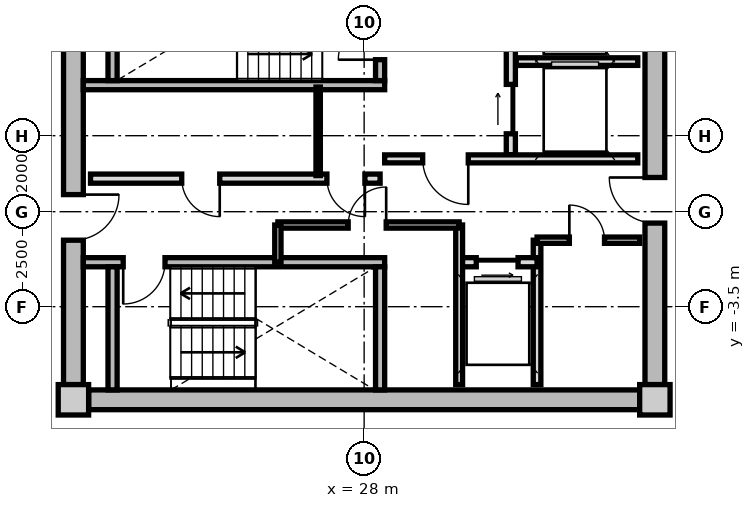
"""IFC4 building model, lengths in metres.
Left out: names, types, materials, properties, quantities, classifications, styles, units other than length and angle.
Written with IfcOpenShell. Run it as: python <this file> out.ifc"""

import sys

from ifc_helpers import new_model, si_unit, direction, frame, frame_2d, origin, origin_2d, place, context, subcontext, project, spatial, rectangle, extrude, source, transform, mapped, element, fill, save


model = new_model("IFC4")
c1 = context("Model", 3, precision=1e-05, world=origin(), true_north=direction((0.0, 1.0)))
c2 = subcontext(c1, "Body", "Model", "MODEL_VIEW")
j1 = project(units=[si_unit("LENGTHUNIT", "METRE"), si_unit("PLANEANGLEUNIT", "RADIAN")], contexts=[c1])
p1 = place(None, origin())
s1 = spatial("IfcSite", under=j1, at=p1, CompositionType="ELEMENT")
p2 = place(p1, origin())
s2 = spatial("IfcBuilding", under=s1, at=p2, CompositionType="ELEMENT")
p3 = place(p2, frame((0.0, 0.0, 193.7)))
s3 = spatial("IfcBuildingStorey", under=s2, at=p3, CompositionType="ELEMENT", Elevation=193.7)
m1 = source(origin(), c2, "Body", "SweptSolid", [
    extrude(rectangle(XDim=0.8, YDim=0.8, at=origin_2d()), origin(), (0.0, 0.0, 1.0), 3.05),
])
for number, where, z_axis, x_axis in (
    (1, (20.35, -5.95, 0.0), (0.0, 0.0, 1.0), (1.0, 0.0, 0.0)),
    (2, (35.65, -5.95, 0.0), (0.0, 0.0, 1.0), (1.0, 0.0, 0.0)),
):
    element("IfcColumn", number, at=place(p3, frame(where, z_axis=z_axis, x_axis=x_axis)), inside=s3, PredefinedType="COLUMN", context=c2, shape_type="MappedRepresentation", body=[
        mapped(m1, transform((0.0, 0.0, 0.0), x_axis=(1.0, 0.0, 0.0), y_axis=(0.0, 1.0, 0.0), z_axis=(0.0, 0.0, 1.0), scale=1.0)),
    ])
m2 = source(origin(), c2, "Body", "SweptSolid", [
    extrude(rectangle(XDim=14.5, YDim=0.52, at=frame_2d((7.25, 0.0))), origin(), (0.0, 0.0, 1.0), 2.81),
])
p4 = place(p3, frame((35.25, -5.95, 0.0), z_axis=(0.0, 0.0, 1.0), x_axis=(-1.0, 0.0, 0.0)))
e3 = element("IfcWall", 3, at=p4, inside=s3, PredefinedType="SHEAR", context=c2, shape_type="MappedRepresentation", body=[
    mapped(m2, transform((0.0, 0.0, 0.0), x_axis=(1.0, 0.0, 0.0), y_axis=(0.0, 1.0, 0.0), z_axis=(0.0, 0.0, 1.0), scale=1.0)),
])
m3 = source(origin(), c2, "Body", "SweptSolid", [
    extrude(rectangle(XDim=11.1, YDim=0.52, at=frame_2d((5.55, 0.0))), origin(), (0.0, 0.0, 1.0), 2.81),
])
p5 = place(p3, frame((20.35, -5.55, 0.0), z_axis=(0.0, 0.0, 1.0), x_axis=(0.0, 1.0, 0.0)))
e4 = element("IfcWall", 4, at=p5, inside=s3, PredefinedType="SHEAR", context=c2, shape_type="MappedRepresentation", body=[
    mapped(m3, transform((0.0, 0.0, 0.0), x_axis=(1.0, 0.0, 0.0), y_axis=(0.0, 1.0, 0.0), z_axis=(0.0, 0.0, 1.0), scale=1.0)),
])
p6 = place(p5, frame((3.8, 0.0, 0.0)))
e5 = element("IfcOpeningElement", 5, at=p6, cuts=e4, PredefinedType="OPENING", context=c2, shape_type="SweptSolid", body=[
    extrude(rectangle(XDim=1.2, YDim=2.15, at=frame_2d((0.6, 1.075))), frame((0.0, 0.27, 0.0), z_axis=(0.0, -1.0, 0.0), x_axis=(1.0, 0.0, 0.0)), (0.0, 0.0, 1.0), 0.54),
])
p7 = place(p3, frame((35.65, 5.55, 0.0), z_axis=(0.0, 0.0, 1.0), x_axis=(0.0, -1.0, 0.0)))
e6 = element("IfcWall", 6, at=p7, inside=s3, PredefinedType="SHEAR", context=c2, shape_type="MappedRepresentation", body=[
    mapped(m3, transform((0.0, 0.0, 0.0), x_axis=(1.0, 0.0, 0.0), y_axis=(0.0, 1.0, 0.0), z_axis=(0.0, 0.0, 1.0), scale=1.0)),
])
p8 = place(p7, frame((5.65, 0.0, 0.0)))
e7 = element("IfcOpeningElement", 7, at=p8, cuts=e6, PredefinedType="OPENING", context=c2, shape_type="SweptSolid", body=[
    extrude(rectangle(XDim=1.2, YDim=2.15, at=frame_2d((0.6, 1.075))), frame((0.0, 0.27, 0.0), z_axis=(0.0, -1.0, 0.0), x_axis=(1.0, 0.0, 0.0)), (0.0, 0.0, 1.0), 0.54),
])
m4 = source(origin(), c2, "Body", "SweptSolid", [
    extrude(rectangle(XDim=7.93, YDim=0.24, at=frame_2d((3.965, 0.0))), origin(), (0.0, 0.0, 1.0), 2.81),
])
p9 = place(p3, frame((20.61, 2.33, 0.0), z_axis=(0.0, 0.0, 1.0), x_axis=(1.0, 0.0, 0.0)))
e8 = element("IfcWall", 8, at=p9, inside=s3, PredefinedType="PARTITIONING", context=c2, shape_type="MappedRepresentation", body=[
    mapped(m4, transform((0.0, 0.0, 0.0), x_axis=(1.0, 0.0, 0.0), y_axis=(0.0, 1.0, 0.0), z_axis=(0.0, 0.0, 1.0), scale=1.0)),
])
m5 = source(origin(), c2, "Body", "SweptSolid", [
    extrude(rectangle(XDim=3.24, YDim=0.24, at=frame_2d((1.62, 0.0))), origin(), (0.0, 0.0, 1.0), 2.81),
])
p10 = place(p3, frame((21.38, 2.45, 0.0), z_axis=(0.0, 0.0, 1.0), x_axis=(0.0, 1.0, 0.0)))
e9 = element("IfcWall", 9, at=p10, inside=s3, PredefinedType="PARTITIONING", context=c2, shape_type="MappedRepresentation", body=[
    mapped(m5, transform((0.0, 0.0, 0.0), x_axis=(1.0, 0.0, 0.0), y_axis=(0.0, 1.0, 0.0), z_axis=(0.0, 0.0, 1.0), scale=1.0)),
])
p11 = place(p3, frame((28.42, 2.45, 0.0), z_axis=(0.0, 0.0, 1.0), x_axis=(0.0, 1.0, 0.0)))
e10 = element("IfcWall", 10, at=p11, inside=s3, PredefinedType="PARTITIONING", context=c2, shape_type="MappedRepresentation", body=[
    mapped(m5, transform((0.0, 0.0, 0.0), x_axis=(1.0, 0.0, 0.0), y_axis=(0.0, 1.0, 0.0), z_axis=(0.0, 0.0, 1.0), scale=1.0)),
])
p12 = place(p11, frame((0.55, 0.0, 0.0)))
e11 = element("IfcOpeningElement", 11, at=p12, cuts=e10, PredefinedType="OPENING", context=c2, shape_type="SweptSolid", body=[
    extrude(rectangle(XDim=1.1, YDim=2.15, at=frame_2d((0.55, 1.075))), frame((0.0, 0.13, 0.0), z_axis=(0.0, -1.0, 0.0), x_axis=(1.0, 0.0, 0.0)), (0.0, 0.0, 1.0), 0.26),
])
p13 = place(p3, frame((20.61, -2.33, 0.0), z_axis=(0.0, 0.0, 1.0), x_axis=(1.0, 0.0, 0.0)))
e12 = element("IfcWall", 12, at=p13, inside=s3, PredefinedType="PARTITIONING", context=c2, shape_type="MappedRepresentation", body=[
    mapped(m4, transform((0.0, 0.0, 0.0), x_axis=(1.0, 0.0, 0.0), y_axis=(0.0, 1.0, 0.0), z_axis=(0.0, 0.0, 1.0), scale=1.0)),
])
p14 = place(p13, frame((1.05, 0.0, 0.0)))
e13 = element("IfcOpeningElement", 13, at=p14, cuts=e12, PredefinedType="OPENING", context=c2, shape_type="SweptSolid", body=[
    extrude(rectangle(XDim=1.1, YDim=2.15, at=frame_2d((0.55, 1.075))), frame((0.0, 0.13, 0.0), z_axis=(0.0, -1.0, 0.0), x_axis=(1.0, 0.0, 0.0)), (0.0, 0.0, 1.0), 0.26),
])
for number, where, z_axis, x_axis in (
    (14, (21.38, -5.69, 0.0), (0.0, 0.0, 1.0), (0.0, 1.0, 0.0)),
    (15, (28.42, -5.69, 0.0), (0.0, 0.0, 1.0), (0.0, 1.0, 0.0)),
):
    element("IfcWall", number, at=place(p3, frame(where, z_axis=z_axis, x_axis=x_axis)), inside=s3, PredefinedType="PARTITIONING", context=c2, shape_type="MappedRepresentation", body=[
        mapped(m5, transform((0.0, 0.0, 0.0), x_axis=(1.0, 0.0, 0.0), y_axis=(0.0, 1.0, 0.0), z_axis=(0.0, 0.0, 1.0), scale=1.0)),
    ])
m6 = source(origin(), c2, "Body", "SweptSolid", [
    extrude(rectangle(XDim=5.0, YDim=0.24, at=frame_2d((2.5, 0.0))), origin(), (0.0, 0.0, 1.0), 2.795),
])
p15 = place(p3, frame((31.86, 0.5, 0.0), z_axis=(0.0, 0.0, 1.0), x_axis=(0.0, 1.0, 0.0)))
e16 = element("IfcWall", 16, at=p15, inside=s3, PredefinedType="PARTITIONING", context=c2, shape_type="MappedRepresentation", body=[
    mapped(m6, transform((0.0, 0.0, 0.0), x_axis=(1.0, 0.0, 0.0), y_axis=(0.0, 1.0, 0.0), z_axis=(0.0, 0.0, 1.0), scale=1.0)),
])
p16 = place(p15, frame((3.05, 0.0, 0.0)))
e17 = element("IfcOpeningElement", 17, at=p16, cuts=e16, PredefinedType="OPENING", context=c2, shape_type="SweptSolid", body=[
    extrude(rectangle(XDim=1.3, YDim=2.2, at=frame_2d((0.65, 1.1))), frame((0.0, 0.13, 0.0), z_axis=(0.0, -1.0, 0.0), x_axis=(1.0, 0.0, 0.0)), (0.0, 0.0, 1.0), 0.26),
])
p17 = place(p15, frame((0.55, 0.0, 0.0)))
e18 = element("IfcOpeningElement", 18, at=p17, cuts=e16, PredefinedType="OPENING", context=c2, shape_type="SweptSolid", body=[
    extrude(rectangle(XDim=1.3, YDim=2.2, at=frame_2d((0.65, 1.1))), frame((0.0, 0.13, 0.0), z_axis=(0.0, -1.0, 0.0), x_axis=(1.0, 0.0, 0.0)), (0.0, 0.0, 1.0), 0.26),
])
m7 = source(origin(), c2, "Body", "SweptSolid", [
    extrude(rectangle(XDim=3.2, YDim=0.2, at=frame_2d((1.6, 0.0))), origin(), (0.0, 0.0, 1.0), 2.795),
])
p18 = place(p3, frame((32.0, 2.95, 0.0), z_axis=(0.0, 0.0, 1.0), x_axis=(1.0, 0.0, 0.0)))
e19 = element("IfcWall", 19, at=p18, inside=s3, PredefinedType="PARTITIONING", context=c2, shape_type="MappedRepresentation", body=[
    mapped(m7, transform((0.0, 0.0, 0.0), x_axis=(1.0, 0.0, 0.0), y_axis=(0.0, 1.0, 0.0), z_axis=(0.0, 0.0, 1.0), scale=1.0)),
])
m8 = source(origin(), c2, "Body", "SweptSolid", [
    extrude(rectangle(XDim=6.66, YDim=0.21, at=frame_2d((3.33, 0.0))), origin(), (0.0, 0.0, 1.0), 2.795),
])
p19 = place(p3, frame((28.54, 0.39, 0.0), z_axis=(0.0, 0.0, 1.0), x_axis=(1.0, 0.0, 0.0)))
e20 = element("IfcWall", 20, at=p19, inside=s3, PredefinedType="PARTITIONING", context=c2, shape_type="MappedRepresentation", body=[
    mapped(m8, transform((0.0, 0.0, 0.0), x_axis=(1.0, 0.0, 0.0), y_axis=(0.0, 1.0, 0.0), z_axis=(0.0, 0.0, 1.0), scale=1.0)),
])
p20 = place(p19, frame((1.0, 0.0, 0.0)))
e21 = element("IfcOpeningElement", 21, at=p20, cuts=e20, PredefinedType="OPENING", context=c2, shape_type="SweptSolid", body=[
    extrude(rectangle(XDim=1.2, YDim=2.15, at=frame_2d((0.6, 1.075))), frame((0.0, 0.115, 0.0), z_axis=(0.0, -1.0, 0.0), x_axis=(1.0, 0.0, 0.0)), (0.0, 0.0, 1.0), 0.23),
])
m9 = source(origin(), c2, "Body", "SweptSolid", [
    extrude(rectangle(XDim=7.62, YDim=0.24, at=frame_2d((3.81, 0.0))), origin(), (0.0, 0.0, 1.0), 2.795),
])
p21 = place(p3, frame((20.8, -0.13, 0.0), z_axis=(0.0, 0.0, 1.0), x_axis=(1.0, 0.0, 0.0)))
e22 = element("IfcWall", 22, at=p21, inside=s3, PredefinedType="PARTITIONING", context=c2, shape_type="MappedRepresentation", body=[
    mapped(m9, transform((0.0, 0.0, 0.0), x_axis=(1.0, 0.0, 0.0), y_axis=(0.0, 1.0, 0.0), z_axis=(0.0, 0.0, 1.0), scale=1.0)),
])
p22 = place(p21, frame((6.22, 0.0, 0.0)))
e23 = element("IfcOpeningElement", 23, at=p22, cuts=e22, PredefinedType="OPENING", context=c2, shape_type="SweptSolid", body=[
    extrude(rectangle(XDim=1.0, YDim=2.1, at=frame_2d((0.5, 1.05))), frame((0.0, 0.13, 0.0), z_axis=(0.0, -1.0, 0.0), x_axis=(1.0, 0.0, 0.0)), (0.0, 0.0, 1.0), 0.26),
])
p23 = place(p21, frame((2.4, 0.0, 0.0)))
e24 = element("IfcOpeningElement", 24, at=p23, cuts=e22, PredefinedType="OPENING", context=c2, shape_type="SweptSolid", body=[
    extrude(rectangle(XDim=1.0, YDim=2.1, at=frame_2d((0.5, 1.05))), frame((0.0, 0.13, 0.0), z_axis=(0.0, -1.0, 0.0), x_axis=(1.0, 0.0, 0.0)), (0.0, 0.0, 1.0), 0.26),
])
m10 = source(origin(), c2, "Body", "SweptSolid", [
    extrude(rectangle(XDim=2.33, YDim=0.115, at=frame_2d((1.165, 0.0))), origin(), (0.0, 0.0, 1.0), 2.795),
])
p24 = place(p3, frame((26.79, -0.05, 0.0), z_axis=(0.0, 0.0, 1.0), x_axis=(0.0, 1.0, 0.0)))
e25 = element("IfcWall", 25, at=p24, inside=s3, PredefinedType="PARTITIONING", context=c2, shape_type="MappedRepresentation", body=[
    mapped(m10, transform((0.0, 0.0, 0.0), x_axis=(1.0, 0.0, 0.0), y_axis=(0.0, 1.0, 0.0), z_axis=(0.0, 0.0, 1.0), scale=1.0)),
])
m11 = source(origin(), c2, "Body", "SweptSolid", [
    extrude(rectangle(XDim=3.8, YDim=0.2, at=frame_2d((1.9, 0.0))), origin(), (0.0, 0.0, 1.0), 2.795),
])
p25 = place(p3, frame((32.55, -5.55, 0.0), z_axis=(0.0, 0.0, 1.0), x_axis=(0.0, 1.0, 0.0)))
e26 = element("IfcWall", 26, at=p25, inside=s3, PredefinedType="PARTITIONING", context=c2, shape_type="MappedRepresentation", body=[
    mapped(m11, transform((0.0, 0.0, 0.0), x_axis=(1.0, 0.0, 0.0), y_axis=(0.0, 1.0, 0.0), z_axis=(0.0, 0.0, 1.0), scale=1.0)),
])
m12 = source(origin(), c2, "Body", "SweptSolid", [
    extrude(rectangle(XDim=2.05, YDim=0.24, at=frame_2d((1.025, 0.0))), origin(), (0.0, 0.0, 1.0), 2.795),
])
p26 = place(p3, frame((30.5, -2.33, 0.0), z_axis=(0.0, 0.0, 1.0), x_axis=(1.0, 0.0, 0.0)))
e27 = element("IfcWall", 27, at=p26, inside=s3, PredefinedType="PARTITIONING", context=c2, shape_type="MappedRepresentation", body=[
    mapped(m12, transform((0.0, 0.0, 0.0), x_axis=(1.0, 0.0, 0.0), y_axis=(0.0, 1.0, 0.0), z_axis=(0.0, 0.0, 1.0), scale=1.0)),
])
p27 = place(p26, frame((0.45, 0.0, 0.0)))
e28 = element("IfcOpeningElement", 28, at=p27, cuts=e27, PredefinedType="OPENING", context=c2, shape_type="SweptSolid", body=[
    extrude(rectangle(XDim=1.1, YDim=2.2, at=frame_2d((0.55, 1.1))), frame((0.0, 0.13, 0.0), z_axis=(0.0, -1.0, 0.0), x_axis=(1.0, 0.0, 0.0)), (0.0, 0.0, 1.0), 0.26),
])
m13 = source(origin(), c2, "Body", "SweptSolid", [
    extrude(rectangle(XDim=4.2, YDim=0.18, at=frame_2d((2.1, 0.0))), origin(), (0.0, 0.0, 1.0), 2.795),
])
p28 = place(p3, frame((30.5, -5.55, 0.0), z_axis=(0.0, 0.0, 1.0), x_axis=(0.0, 1.0, 0.0)))
e29 = element("IfcWall", 29, at=p28, inside=s3, PredefinedType="PARTITIONING", context=c2, shape_type="MappedRepresentation", body=[
    mapped(m13, transform((0.0, 0.0, 0.0), x_axis=(1.0, 0.0, 0.0), y_axis=(0.0, 1.0, 0.0), z_axis=(0.0, 0.0, 1.0), scale=1.0)),
])
m14 = source(origin(), c2, "Body", "SweptSolid", [
    extrude(rectangle(XDim=4.77, YDim=0.165, at=frame_2d((2.385, 0.0))), origin(), (0.0, 0.0, 1.0), 2.795),
])
p29 = place(p3, frame((25.73, -1.35, 0.0), z_axis=(0.0, 0.0, 1.0), x_axis=(1.0, 0.0, 0.0)))
e30 = element("IfcWall", 30, at=p29, inside=s3, PredefinedType="PARTITIONING", context=c2, shape_type="MappedRepresentation", body=[
    mapped(m14, transform((0.0, 0.0, 0.0), x_axis=(1.0, 0.0, 0.0), y_axis=(0.0, 1.0, 0.0), z_axis=(0.0, 0.0, 1.0), scale=1.0)),
])
p30 = place(p29, frame((1.85, 0.0, 0.0)))
e31 = element("IfcOpeningElement", 31, at=p30, cuts=e30, PredefinedType="OPENING", context=c2, shape_type="SweptSolid", body=[
    extrude(rectangle(XDim=1.0, YDim=2.1, at=frame_2d((0.5, 1.05))), frame((0.0, 0.093, 0.0), z_axis=(0.0, -1.0, 0.0), x_axis=(1.0, 0.0, 0.0)), (0.0, 0.0, 1.0), 0.185),
])
m15 = source(origin(), c2, "Body", "SweptSolid", [
    extrude(rectangle(XDim=0.98, YDim=0.165, at=frame_2d((0.49, 0.0))), origin(), (0.0, 0.0, 1.0), 2.795),
])
p31 = place(p3, frame((25.73, -2.33, 0.0), z_axis=(0.0, 0.0, 1.0), x_axis=(0.0, 1.0, 0.0)))
e32 = element("IfcWall", 32, at=p31, inside=s3, PredefinedType="PARTITIONING", context=c2, shape_type="MappedRepresentation", body=[
    mapped(m15, transform((0.0, 0.0, 0.0), x_axis=(1.0, 0.0, 0.0), y_axis=(0.0, 1.0, 0.0), z_axis=(0.0, 0.0, 1.0), scale=1.0)),
])
m16 = source(origin(), c2, "Body", "SweptSolid", [
    extrude(rectangle(XDim=2.7, YDim=0.165, at=frame_2d((1.35, 0.0))), origin(), (0.0, 0.0, 1.0), 2.795),
])
p32 = place(p3, frame((32.55, -1.75, 0.0), z_axis=(0.0, 0.0, 1.0), x_axis=(1.0, 0.0, 0.0)))
e33 = element("IfcWall", 33, at=p32, inside=s3, PredefinedType="PARTITIONING", context=c2, shape_type="MappedRepresentation", body=[
    mapped(m16, transform((0.0, 0.0, 0.0), x_axis=(1.0, 0.0, 0.0), y_axis=(0.0, 1.0, 0.0), z_axis=(0.0, 0.0, 1.0), scale=1.0)),
])
p33 = place(p32, frame((0.85, 0.0, 0.0)))
e34 = element("IfcOpeningElement", 34, at=p33, cuts=e33, PredefinedType="OPENING", context=c2, shape_type="SweptSolid", body=[
    extrude(rectangle(XDim=0.925, YDim=2.1, at=frame_2d((0.462, 1.05))), frame((0.0, 0.093, 0.0), z_axis=(0.0, -1.0, 0.0), x_axis=(1.0, 0.0, 0.0)), (0.0, 0.0, 1.0), 0.185),
])
m17 = source(origin(), c2, "Body", "SweptSolid", [
    extrude(rectangle(XDim=1.1, YDim=2.15, at=frame_2d((0.55, 1.075))), frame((0.0, 0.025, 0.0), z_axis=(0.0, -1.0, 0.0), x_axis=(1.0, 0.0, 0.0)), (0.0, 0.0, 1.0), 0.05),
])
p34 = place(p12, origin())
e35 = element("IfcDoor", 35, at=p34, inside=s3, OperationType="SINGLE_SWING_LEFT", PredefinedType="DOOR", context=c2, shape_type="MappedRepresentation", body=[
    mapped(m17, transform((0.0, 0.0, 0.0), x_axis=(1.0, 0.0, 0.0), y_axis=(0.0, 1.0, 0.0), z_axis=(0.0, 0.0, 1.0), scale=1.0)),
])
fill(e11, e35)
p35 = place(p14, frame((1.1, 0.0, 0.0), z_axis=(0.0, 0.0, 1.0), x_axis=(-1.0, 0.0, 0.0)))
e36 = element("IfcDoor", 36, at=p35, inside=s3, OperationType="SINGLE_SWING_RIGHT", PredefinedType="DOOR", context=c2, shape_type="MappedRepresentation", body=[
    mapped(m17, transform((0.0, 0.0, 0.0), x_axis=(1.0, 0.0, 0.0), y_axis=(0.0, 1.0, 0.0), z_axis=(0.0, 0.0, 1.0), scale=1.0)),
])
fill(e13, e36)
m18 = source(origin(), c2, "Body", "SweptSolid", [
    extrude(rectangle(XDim=1.3, YDim=2.2, at=frame_2d((0.65, 1.1))), frame((0.0, 0.025, 0.0), z_axis=(0.0, -1.0, 0.0), x_axis=(1.0, 0.0, 0.0)), (0.0, 0.0, 1.0), 0.05),
])
p36 = place(p17, origin())
e37 = element("IfcDoor", 37, at=p36, inside=s3, OperationType="SLIDING_TO_RIGHT", PredefinedType="DOOR", context=c2, shape_type="MappedRepresentation", body=[
    mapped(m18, transform((0.0, 0.0, 0.0), x_axis=(1.0, 0.0, 0.0), y_axis=(0.0, 1.0, 0.0), z_axis=(0.0, 0.0, 1.0), scale=1.0)),
])
fill(e18, e37)
m19 = source(origin(), c2, "Body", "SweptSolid", [
    extrude(rectangle(XDim=1.2, YDim=2.15, at=frame_2d((0.6, 1.075))), frame((0.0, 0.025, 0.0), z_axis=(0.0, -1.0, 0.0), x_axis=(1.0, 0.0, 0.0)), (0.0, 0.0, 1.0), 0.05),
])
p37 = place(p20, frame((1.2, 0.0, 0.0), z_axis=(0.0, 0.0, 1.0), x_axis=(-1.0, 0.0, 0.0)))
e38 = element("IfcDoor", 38, at=p37, inside=s3, OperationType="SINGLE_SWING_LEFT", PredefinedType="DOOR", context=c2, shape_type="MappedRepresentation", body=[
    mapped(m19, transform((0.0, 0.0, 0.0), x_axis=(1.0, 0.0, 0.0), y_axis=(0.0, 1.0, 0.0), z_axis=(0.0, 0.0, 1.0), scale=1.0)),
])
fill(e21, e38)
p38 = place(p6, frame((1.2, 0.0, 0.0), z_axis=(0.0, 0.0, 1.0), x_axis=(-1.0, 0.0, 0.0)))
e39 = element("IfcDoor", 39, at=p38, inside=s3, OperationType="SINGLE_SWING_LEFT", PredefinedType="DOOR", context=c2, shape_type="MappedRepresentation", body=[
    mapped(m19, transform((0.0, 0.0, 0.0), x_axis=(1.0, 0.0, 0.0), y_axis=(0.0, 1.0, 0.0), z_axis=(0.0, 0.0, 1.0), scale=1.0)),
])
fill(e5, e39)
p39 = place(p8, frame((1.2, 0.0, 0.0), z_axis=(0.0, 0.0, 1.0), x_axis=(-1.0, 0.0, 0.0)))
e40 = element("IfcDoor", 40, at=p39, inside=s3, OperationType="SINGLE_SWING_RIGHT", PredefinedType="DOOR", context=c2, shape_type="MappedRepresentation", body=[
    mapped(m19, transform((0.0, 0.0, 0.0), x_axis=(1.0, 0.0, 0.0), y_axis=(0.0, 1.0, 0.0), z_axis=(0.0, 0.0, 1.0), scale=1.0)),
])
fill(e7, e40)
m20 = source(origin(), c2, "Body", "SweptSolid", [
    extrude(rectangle(XDim=1.0, YDim=2.1, at=frame_2d((0.5, 1.05))), frame((0.0, 0.025, 0.0), z_axis=(0.0, -1.0, 0.0), x_axis=(1.0, 0.0, 0.0)), (0.0, 0.0, 1.0), 0.05),
])
p40 = place(p22, frame((1.0, 0.0, 0.0), z_axis=(0.0, 0.0, 1.0), x_axis=(-1.0, 0.0, 0.0)))
e41 = element("IfcDoor", 41, at=p40, inside=s3, OperationType="SINGLE_SWING_LEFT", PredefinedType="DOOR", context=c2, shape_type="MappedRepresentation", body=[
    mapped(m20, transform((0.0, 0.0, 0.0), x_axis=(1.0, 0.0, 0.0), y_axis=(0.0, 1.0, 0.0), z_axis=(0.0, 0.0, 1.0), scale=1.0)),
])
fill(e23, e41)
p41 = place(p23, frame((1.0, 0.0, 0.0), z_axis=(0.0, 0.0, 1.0), x_axis=(-1.0, 0.0, 0.0)))
e42 = element("IfcDoor", 42, at=p41, inside=s3, OperationType="SINGLE_SWING_LEFT", PredefinedType="DOOR", context=c2, shape_type="MappedRepresentation", body=[
    mapped(m20, transform((0.0, 0.0, 0.0), x_axis=(1.0, 0.0, 0.0), y_axis=(0.0, 1.0, 0.0), z_axis=(0.0, 0.0, 1.0), scale=1.0)),
])
fill(e24, e42)
m21 = source(origin(), c2, "Body", "SweptSolid", [
    extrude(rectangle(XDim=1.1, YDim=2.2, at=frame_2d((0.55, 1.1))), frame((0.0, 0.025, 0.0), z_axis=(0.0, -1.0, 0.0), x_axis=(1.0, 0.0, 0.0)), (0.0, 0.0, 1.0), 0.05),
])
p42 = place(p27, frame((1.1, 0.0, 0.0), z_axis=(0.0, 0.0, 1.0), x_axis=(-1.0, 0.0, 0.0)))
e43 = element("IfcDoor", 43, at=p42, inside=s3, OperationType="SLIDING_TO_RIGHT", PredefinedType="DOOR", context=c2, shape_type="MappedRepresentation", body=[
    mapped(m21, transform((0.0, 0.0, 0.0), x_axis=(1.0, 0.0, 0.0), y_axis=(0.0, 1.0, 0.0), z_axis=(0.0, 0.0, 1.0), scale=1.0)),
])
fill(e28, e43)
p43 = place(p30, origin())
e44 = element("IfcDoor", 44, at=p43, inside=s3, OperationType="SINGLE_SWING_RIGHT", PredefinedType="DOOR", context=c2, shape_type="MappedRepresentation", body=[
    mapped(m20, transform((0.0, 0.0, 0.0), x_axis=(1.0, 0.0, 0.0), y_axis=(0.0, 1.0, 0.0), z_axis=(0.0, 0.0, 1.0), scale=1.0)),
])
fill(e31, e44)
m22 = source(origin(), c2, "Body", "SweptSolid", [
    extrude(rectangle(XDim=0.925, YDim=2.1, at=frame_2d((0.462, 1.05))), frame((0.0, 0.025, 0.0), z_axis=(0.0, -1.0, 0.0), x_axis=(1.0, 0.0, 0.0)), (0.0, 0.0, 1.0), 0.05),
])
p44 = place(p33, origin())
e45 = element("IfcDoor", 45, at=p44, inside=s3, OperationType="SINGLE_SWING_LEFT", PredefinedType="DOOR", context=c2, shape_type="MappedRepresentation", body=[
    mapped(m22, transform((0.0, 0.0, 0.0), x_axis=(1.0, 0.0, 0.0), y_axis=(0.0, 1.0, 0.0), z_axis=(0.0, 0.0, 1.0), scale=1.0)),
])
fill(e34, e45)
save(model, sys.argv[1])
